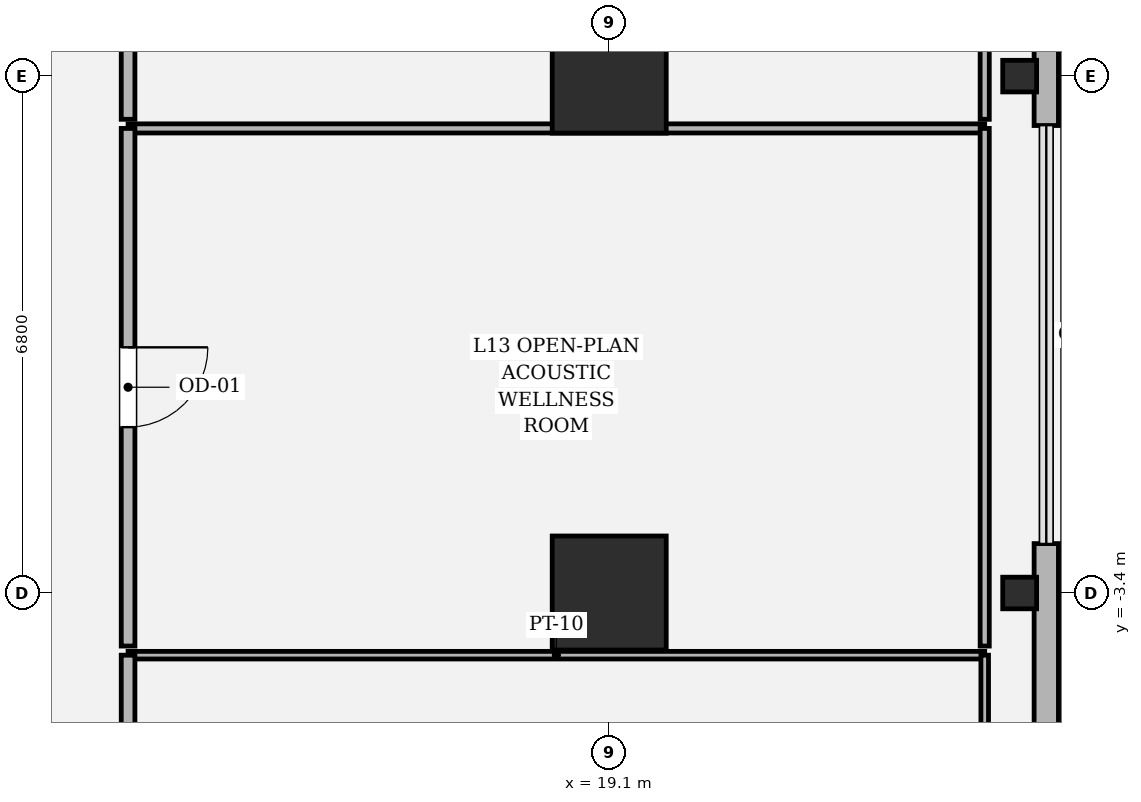
"""IFC4 building model, lengths in metres.
Left out: names, types, materials, properties, quantities, classifications, styles, units other than length and angle.
Written with IfcOpenShell. Run it as: python <this file> out.ifc"""

import sys

from ifc_helpers import new_model, si_unit, direction, frame, frame_2d, origin, origin_2d, place, context, subcontext, project, spatial, rectangle, hollow_rectangle, i_section, extrude, element, fill, save


model = new_model("IFC4")
c1 = context("Model", 3, precision=1e-05, world=origin(), true_north=direction((0.0, 1.0)))
c2 = subcontext(c1, "Body", "Model", "MODEL_VIEW")
j1 = project(units=[si_unit("LENGTHUNIT", "METRE"), si_unit("PLANEANGLEUNIT", "RADIAN")], contexts=[c1])
p1 = place(None, origin())
s1 = spatial("IfcSite", under=j1, at=p1, CompositionType="ELEMENT")
p2 = place(p1, origin())
s2 = spatial("IfcBuilding", under=s1, at=p2, CompositionType="ELEMENT")
p3 = place(p2, frame((0.0, 0.0, 60.6)))
s3 = spatial("IfcBuildingStorey", under=s2, at=p3, CompositionType="ELEMENT", Elevation=60.6)
for number, where, z_axis, x_axis in (
    (1, (19.1, -3.4, 0.0), (0.0, 0.0, 1.0), (1.0, 0.0, 0.0)),
    (2, (19.1, 3.4, 0.0), (0.0, 0.0, 1.0), (1.0, 0.0, 0.0)),
):
    element("IfcColumn", number, at=place(p3, frame(where, z_axis=z_axis, x_axis=x_axis)), inside=s3, PredefinedType="COLUMN", context=c2, shape_type="SweptSolid", body=[
        extrude(hollow_rectangle(XDim=1.5, YDim=1.5, WallThickness=0.045, at=origin_2d()), origin(), (0.0, 0.0, 1.0), 4.05),
    ])
for number, where, z_axis, x_axis in (
    (3, (24.5, -3.4, 0.0), (0.0, 0.0, 1.0), (0.0, 1.0, 0.0)),
    (4, (24.5, 3.4, 0.0), (0.0, 0.0, 1.0), (0.0, 1.0, 0.0)),
):
    element("IfcColumn", number, at=place(p3, frame(where, z_axis=z_axis, x_axis=x_axis)), inside=s3, PredefinedType="COLUMN", context=c2, shape_type="SweptSolid", body=[
        extrude(i_section(OverallWidth=0.416, OverallDepth=0.446, WebThickness=0.039, FlangeThickness=0.062, FilletRadius=0.018, at=origin_2d()), origin(), (0.0, 0.0, 1.0), 4.048),
    ])
p4 = place(p3, frame((24.85, -20.237, 0.0), z_axis=(0.0, 0.0, 1.0), x_axis=(0.0, 1.0, 0.0)))
e5 = element("IfcWall", 5, at=p4, inside=s3, PredefinedType="SOLIDWALL", context=c2, shape_type="SweptSolid", body=[
    extrude(rectangle(XDim=17.487, YDim=0.32, at=frame_2d((8.743, 0.0))), origin(), (0.0, 0.0, 1.0), 2.524),
])
p5 = place(p3, frame((24.85, 2.75, 0.0), z_axis=(0.0, 0.0, 1.0), x_axis=(0.0, 1.0, 0.0)))
e6 = element("IfcWall", 6, at=p5, inside=s3, PredefinedType="SOLIDWALL", context=c2, shape_type="SweptSolid", body=[
    extrude(rectangle(XDim=12.687, YDim=0.32, at=frame_2d((6.344, 0.0))), origin(), (0.0, 0.0, 1.0), 2.524),
])
p6 = place(p3, frame((12.77, -4.218, 0.0), z_axis=(0.0, 0.0, 1.0), x_axis=(1.0, 0.0, 0.0)))
e7 = element("IfcWall", 7, at=p6, inside=s3, PredefinedType="PARTITIONING", context=c2, shape_type="SweptSolid", body=[
    extrude(rectangle(XDim=11.27, YDim=0.1, at=frame_2d((5.635, 0.0))), origin(), (0.0, 0.0, 1.0), 3.104),
])
p7 = place(p3, frame((24.04, -4.218, 0.0), z_axis=(0.0, 0.0, 1.0), x_axis=(0.0, -1.0, 0.0)))
e8 = element("IfcWall", 8, at=p7, inside=s3, PredefinedType="PARTITIONING", context=c2, shape_type="SweptSolid", body=[
    extrude(rectangle(XDim=7.272, YDim=0.1, at=frame_2d((3.636, 0.0))), origin(), (0.0, 0.0, 1.0), 3.81),
])
p8 = place(p3, frame((12.77, -11.49, 0.0), z_axis=(0.0, 0.0, 1.0), x_axis=(0.0, 1.0, 0.0)))
e9 = element("IfcWall", 9, at=p8, inside=s3, PredefinedType="PARTITIONING", context=c2, shape_type="SweptSolid", body=[
    extrude(rectangle(XDim=7.272, YDim=0.18, at=frame_2d((3.636, 0.0))), origin(), (0.0, 0.0, 1.0), 3.104),
])
p9 = place(p8, frame((2.936, 0.0, 0.0)))
e10 = element("IfcOpeningElement", 10, at=p9, cuts=e9, PredefinedType="OPENING", context=c2, shape_type="SweptSolid", body=[
    extrude(rectangle(XDim=1.4, YDim=2.25, at=frame_2d((0.7, 1.125))), frame((0.0, 0.1, 0.0), z_axis=(0.0, -1.0, 0.0), x_axis=(1.0, 0.0, 0.0)), (0.0, 0.0, 1.0), 0.2),
])
p10 = place(p3, frame((12.77, 2.712, 0.0), z_axis=(0.0, 0.0, 1.0), x_axis=(1.0, 0.0, 0.0)))
e11 = element("IfcWall", 11, at=p10, inside=s3, PredefinedType="PARTITIONING", context=c2, shape_type="SweptSolid", body=[
    extrude(rectangle(XDim=11.27, YDim=0.12, at=frame_2d((5.635, 0.0))), origin(), (0.0, 0.0, 1.0), 3.104),
])
p11 = place(p3, frame((24.04, 2.712, 0.0), z_axis=(0.0, 0.0, 1.0), x_axis=(0.0, -1.0, 0.0)))
e12 = element("IfcWall", 12, at=p11, inside=s3, PredefinedType="PARTITIONING", context=c2, shape_type="SweptSolid", body=[
    extrude(rectangle(XDim=6.81, YDim=0.12, at=frame_2d((3.405, 0.0))), origin(), (0.0, 0.0, 1.0), 2.484),
])
p12 = place(p3, frame((12.77, -4.098, 0.0), z_axis=(0.0, 0.0, 1.0), x_axis=(0.0, 1.0, 0.0)))
e13 = element("IfcWall", 13, at=p12, inside=s3, PredefinedType="PARTITIONING", context=c2, shape_type="SweptSolid", body=[
    extrude(rectangle(XDim=6.81, YDim=0.18, at=frame_2d((3.405, 0.0))), origin(), (0.0, 0.0, 1.0), 3.104),
])
p13 = place(p12, frame((2.88, 0.0, 0.0)))
e14 = element("IfcOpeningElement", 14, at=p13, cuts=e13, PredefinedType="OPENING", context=c2, shape_type="SweptSolid", body=[
    extrude(rectangle(XDim=1.05, YDim=2.2, at=frame_2d((0.525, 1.1))), frame((0.0, 0.1, 0.0), z_axis=(0.0, -1.0, 0.0), x_axis=(1.0, 0.0, 0.0)), (0.0, 0.0, 1.0), 0.2),
])
p14 = place(p3, frame((24.04, 11.49, 0.0), z_axis=(0.0, 0.0, 1.0), x_axis=(0.0, -1.0, 0.0)))
e15 = element("IfcWall", 15, at=p14, inside=s3, PredefinedType="PARTITIONING", context=c2, shape_type="SweptSolid", body=[
    extrude(rectangle(XDim=8.658, YDim=0.12, at=frame_2d((4.329, 0.0))), origin(), (0.0, 0.0, 1.0), 2.484),
])
p15 = place(p3, frame((12.77, 2.832, 0.0), z_axis=(0.0, 0.0, 1.0), x_axis=(0.0, 1.0, 0.0)))
e16 = element("IfcWall", 16, at=p15, inside=s3, PredefinedType="PARTITIONING", context=c2, shape_type="SweptSolid", body=[
    extrude(rectangle(XDim=8.658, YDim=0.18, at=frame_2d((4.329, 0.0))), origin(), (0.0, 0.0, 1.0), 3.104),
])
p16 = place(p15, frame((3.629, 0.0, 0.0)))
e17 = element("IfcOpeningElement", 17, at=p16, cuts=e16, PredefinedType="OPENING", context=c2, shape_type="SweptSolid", body=[
    extrude(rectangle(XDim=1.4, YDim=2.25, at=frame_2d((0.7, 1.125))), frame((0.0, 0.1, 0.0), z_axis=(0.0, -1.0, 0.0), x_axis=(1.0, 0.0, 0.0)), (0.0, 0.0, 1.0), 0.2),
])
p17 = place(p13, origin())
e18 = element("IfcDoor", 18, at=p17, inside=s3, OperationType="SINGLE_SWING_RIGHT", PredefinedType="DOOR", context=c2, shape_type="SweptSolid", body=[
    extrude(rectangle(XDim=1.05, YDim=2.2, at=frame_2d((0.525, 1.1))), frame((0.0, 0.025, 0.0), z_axis=(0.0, -1.0, 0.0), x_axis=(1.0, 0.0, 0.0)), (0.0, 0.0, 1.0), 0.05),
])
fill(e14, e18)
save(model, sys.argv[1])
